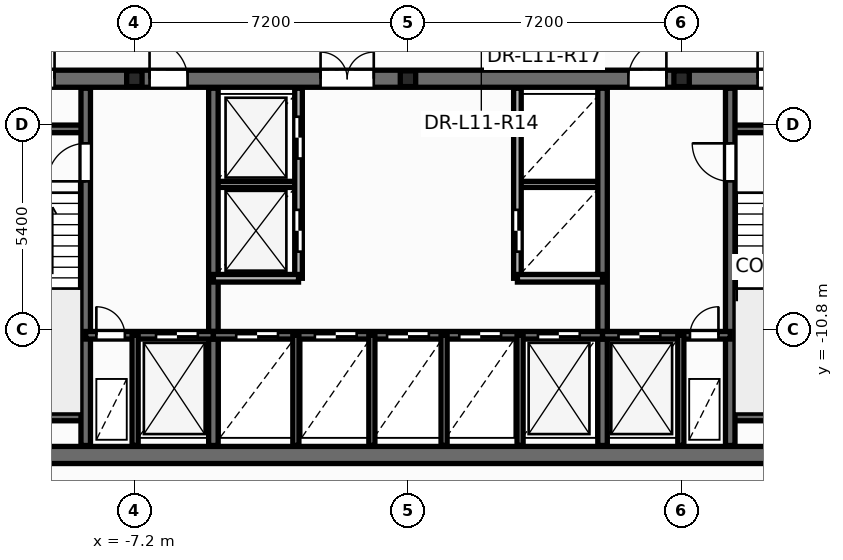
"""IFC4 building model, lengths in metres.
Left out: names, types, materials, properties, quantities, classifications, styles, units other than length and angle.
Written with IfcOpenShell. Run it as: python <this file> out.ifc"""

import sys

from ifc_helpers import new_model, si_unit, direction, frame, frame_2d, origin, origin_2d, place, context, subcontext, project, spatial, rectangle, i_section, extrude, element, fill, save


model = new_model("IFC4")
c1 = context("Model", 3, precision=1e-05, world=origin(), true_north=direction((0.0, 1.0)))
c2 = subcontext(c1, "Body", "Model", "MODEL_VIEW")
j1 = project(units=[si_unit("LENGTHUNIT", "METRE"), si_unit("PLANEANGLEUNIT", "RADIAN")], contexts=[c1])
p1 = place(None, origin())
s1 = spatial("IfcSite", under=j1, at=p1, CompositionType="ELEMENT")
p2 = place(p1, origin())
s2 = spatial("IfcBuilding", under=s1, at=p2, CompositionType="ELEMENT")
p3 = place(p2, frame((0.0, 0.0, 45.9)))
s3 = spatial("IfcBuildingStorey", under=s2, at=p3, CompositionType="ELEMENT", Elevation=45.9)
for number, where, z_axis, x_axis in (
    (1, (-7.2, -4.2, 0.0), (0.0, 0.0, 1.0), (1.0, 0.0, 0.0)),
    (2, (0.0, -4.2, 0.0), (0.0, 0.0, 1.0), (1.0, 0.0, 0.0)),
    (3, (7.2, -4.2, 0.0), (0.0, 0.0, 1.0), (1.0, 0.0, 0.0)),
):
    element("IfcColumn", number, at=place(p3, frame(where, z_axis=z_axis, x_axis=x_axis)), inside=s3, PredefinedType="PILASTER", context=c2, shape_type="SweptSolid", body=[
        extrude(i_section(OverallWidth=0.405, OverallDepth=0.414, WebThickness=0.022, FlangeThickness=0.032, at=origin_2d()), origin(), (0.0, 0.0, 1.0), 3.6),
    ])
for number, where, z_axis, x_axis in (
    (4, (-5.12, -6.98, 0.0), (0.0, 0.0, 1.0), (1.0, 0.0, 0.0)),
    (5, (2.88, -6.98, 0.0), (0.0, 0.0, 1.0), (1.0, 0.0, 0.0)),
):
    element("IfcWall", number, at=place(p3, frame(where, z_axis=z_axis, x_axis=x_axis)), inside=s3, PredefinedType="PARTITIONING", context=c2, shape_type="SweptSolid", body=[
        extrude(rectangle(XDim=2.24, YDim=0.16, at=frame_2d((1.12, 0.0))), origin(), (0.0, 0.0, 1.0), 3.35),
    ])
p4 = place(p3, frame((-12.65, -14.1, 0.0), z_axis=(0.0, 0.0, 1.0), x_axis=(1.0, 0.0, 0.0)))
e6 = element("IfcWall", 6, at=p4, inside=s3, PredefinedType="SHEAR", context=c2, shape_type="SweptSolid", body=[
    extrude(rectangle(XDim=25.3, YDim=0.45, at=frame_2d((12.65, 0.0))), origin(), (0.0, 0.0, 1.0), 3.6),
])
p5 = place(p3, frame((-12.65, -4.2, 0.0), z_axis=(0.0, 0.0, 1.0), x_axis=(1.0, 0.0, 0.0)))
e7 = element("IfcWall", 7, at=p5, inside=s3, PredefinedType="SHEAR", context=c2, shape_type="SweptSolid", body=[
    extrude(rectangle(XDim=25.3, YDim=0.45, at=frame_2d((12.65, 0.0))), origin(), (0.0, 0.0, 1.0), 3.6),
])
p6 = place(p5, frame((0.95, 0.0, 0.0)))
e8 = element("IfcOpeningElement", 8, at=p6, cuts=e7, PredefinedType="OPENING", context=c2, shape_type="SweptSolid", body=[
    extrude(rectangle(XDim=0.756, YDim=2.054, at=frame_2d((0.375, 1.027))), frame((0.0, 0.235, 0.0), z_axis=(0.0, -1.0, 0.0), x_axis=(1.0, 0.0, 0.0)), (0.0, 0.0, 1.0), 0.47),
])
p7 = place(p5, frame((2.6, 0.0, 0.0)))
e9 = element("IfcOpeningElement", 9, at=p7, cuts=e7, PredefinedType="OPENING", context=c2, shape_type="SweptSolid", body=[
    extrude(rectangle(XDim=0.756, YDim=2.054, at=frame_2d((0.375, 1.027))), frame((0.0, 0.235, 0.0), z_axis=(0.0, -1.0, 0.0), x_axis=(1.0, 0.0, 0.0)), (0.0, 0.0, 1.0), 0.47),
])
p8 = place(p5, frame((21.85, 0.0, 0.0)))
e10 = element("IfcOpeningElement", 10, at=p8, cuts=e7, PredefinedType="OPENING", context=c2, shape_type="SweptSolid", body=[
    extrude(rectangle(XDim=0.756, YDim=2.054, at=frame_2d((0.375, 1.027))), frame((0.0, 0.235, 0.0), z_axis=(0.0, -1.0, 0.0), x_axis=(1.0, 0.0, 0.0)), (0.0, 0.0, 1.0), 0.47),
])
p9 = place(p5, frame((23.5, 0.0, 0.0)))
e11 = element("IfcOpeningElement", 11, at=p9, cuts=e7, PredefinedType="OPENING", context=c2, shape_type="SweptSolid", body=[
    extrude(rectangle(XDim=0.756, YDim=2.054, at=frame_2d((0.375, 1.027))), frame((0.0, 0.235, 0.0), z_axis=(0.0, -1.0, 0.0), x_axis=(1.0, 0.0, 0.0)), (0.0, 0.0, 1.0), 0.47),
])
p10 = place(p5, frame((5.85, 0.0, 0.0)))
e12 = element("IfcOpeningElement", 12, at=p10, cuts=e7, PredefinedType="OPENING", context=c2, shape_type="SweptSolid", body=[
    extrude(rectangle(XDim=1.006, YDim=2.104, at=frame_2d((0.5, 1.052))), frame((0.0, 0.235, 0.0), z_axis=(0.0, -1.0, 0.0), x_axis=(1.0, 0.0, 0.0)), (0.0, 0.0, 1.0), 0.47),
])
p11 = place(p5, frame((10.35, 0.0, 0.0)))
e13 = element("IfcOpeningElement", 13, at=p11, cuts=e7, PredefinedType="OPENING", context=c2, shape_type="SweptSolid", body=[
    extrude(rectangle(XDim=1.406, YDim=2.154, at=frame_2d((0.7, 1.077))), frame((0.0, 0.235, 0.0), z_axis=(0.0, -1.0, 0.0), x_axis=(1.0, 0.0, 0.0)), (0.0, 0.0, 1.0), 0.47),
])
p12 = place(p5, frame((18.45, 0.0, 0.0)))
e14 = element("IfcOpeningElement", 14, at=p12, cuts=e7, PredefinedType="OPENING", context=c2, shape_type="SweptSolid", body=[
    extrude(rectangle(XDim=1.006, YDim=2.104, at=frame_2d((0.5, 1.052))), frame((0.0, 0.235, 0.0), z_axis=(0.0, -1.0, 0.0), x_axis=(1.0, 0.0, 0.0)), (0.0, 0.0, 1.0), 0.47),
])
for number, where, z_axis, x_axis in (
    (15, (-12.35, -5.52, 0.0), (0.0, 0.0, 1.0), (1.0, 0.0, 0.0)),
    (16, (-12.35, -13.1, 0.0), (0.0, 0.0, 1.0), (1.0, 0.0, 0.0)),
    (17, (8.48, -5.52, 0.0), (0.0, 0.0, 1.0), (1.0, 0.0, 0.0)),
    (18, (8.48, -13.1, 0.0), (0.0, 0.0, 1.0), (1.0, 0.0, 0.0)),
):
    element("IfcWall", number, at=place(p3, frame(where, z_axis=z_axis, x_axis=x_axis)), inside=s3, PredefinedType="SOLIDWALL", context=c2, shape_type="SweptSolid", body=[
        extrude(rectangle(XDim=3.87, YDim=0.2, at=frame_2d((1.935, 0.0))), origin(), (0.0, 0.0, 1.0), 3.6),
    ])
p13 = place(p3, frame((-8.48, -13.85, 0.0), z_axis=(0.0, 0.0, 1.0), x_axis=(0.0, 1.0, 0.0)))
e19 = element("IfcWall", 19, at=p13, inside=s3, PredefinedType="SHEAR", context=c2, shape_type="SweptSolid", body=[
    extrude(rectangle(XDim=9.4, YDim=0.25, at=frame_2d((4.7, 0.0))), origin(), (0.0, 0.0, 1.0), 3.6),
])
p14 = place(p13, frame((6.95, 0.0, 0.0)))
e20 = element("IfcOpeningElement", 20, at=p14, cuts=e19, PredefinedType="OPENING", context=c2, shape_type="SweptSolid", body=[
    extrude(rectangle(XDim=1.006, YDim=2.104, at=frame_2d((0.5, 1.052))), frame((0.0, 0.135, 0.0), z_axis=(0.0, -1.0, 0.0), x_axis=(1.0, 0.0, 0.0)), (0.0, 0.0, 1.0), 0.27),
])
p15 = place(p3, frame((8.48, -13.85, 0.0), z_axis=(0.0, 0.0, 1.0), x_axis=(0.0, 1.0, 0.0)))
e21 = element("IfcWall", 21, at=p15, inside=s3, PredefinedType="SHEAR", context=c2, shape_type="SweptSolid", body=[
    extrude(rectangle(XDim=9.4, YDim=0.25, at=frame_2d((4.7, 0.0))), origin(), (0.0, 0.0, 1.0), 3.6),
])
p16 = place(p15, frame((6.95, 0.0, 0.0)))
e22 = element("IfcOpeningElement", 22, at=p16, cuts=e21, PredefinedType="OPENING", context=c2, shape_type="SweptSolid", body=[
    extrude(rectangle(XDim=1.006, YDim=2.104, at=frame_2d((0.5, 1.052))), frame((0.0, 0.135, 0.0), z_axis=(0.0, -1.0, 0.0), x_axis=(1.0, 0.0, 0.0)), (0.0, 0.0, 1.0), 0.27),
])
for number, where, z_axis, x_axis in (
    (23, (-5.12, -13.85, 0.0), (0.0, 0.0, 1.0), (0.0, 1.0, 0.0)),
    (24, (5.12, -13.85, 0.0), (0.0, 0.0, 1.0), (0.0, 1.0, 0.0)),
):
    element("IfcWall", number, at=place(p3, frame(where, z_axis=z_axis, x_axis=x_axis)), inside=s3, PredefinedType="SHEAR", context=c2, shape_type="SweptSolid", body=[
        extrude(rectangle(XDim=9.4, YDim=0.25, at=frame_2d((4.7, 0.0))), origin(), (0.0, 0.0, 1.0), 3.6),
    ])
p17 = place(p3, frame((-8.48, -10.95, 0.0), z_axis=(0.0, 0.0, 1.0), x_axis=(1.0, 0.0, 0.0)))
e25 = element("IfcWall", 25, at=p17, inside=s3, PredefinedType="SOLIDWALL", context=c2, shape_type="SweptSolid", body=[
    extrude(rectangle(XDim=3.36, YDim=0.2, at=frame_2d((1.68, 0.0))), origin(), (0.0, 0.0, 1.0), 3.6),
])
p18 = place(p17, frame((0.28, 0.0, 0.0)))
e26 = element("IfcOpeningElement", 26, at=p18, cuts=e25, PredefinedType="OPENING", context=c2, shape_type="SweptSolid", body=[
    extrude(rectangle(XDim=0.756, YDim=2.054, at=frame_2d((0.375, 1.027))), frame((0.0, 0.11, 0.0), z_axis=(0.0, -1.0, 0.0), x_axis=(1.0, 0.0, 0.0)), (0.0, 0.0, 1.0), 0.22),
])
p19 = place(p17, frame((1.85, 0.0, 0.0)))
e27 = element("IfcOpeningElement", 27, at=p19, cuts=e25, PredefinedType="OPENING", context=c2, shape_type="SweptSolid", body=[
    extrude(rectangle(XDim=1.106, YDim=2.104, at=frame_2d((0.55, 1.052))), frame((0.0, 0.11, 0.0), z_axis=(0.0, -1.0, 0.0), x_axis=(1.0, 0.0, 0.0)), (0.0, 0.0, 1.0), 0.22),
])
p20 = place(p3, frame((-5.12, -10.95, 0.0), z_axis=(0.0, 0.0, 1.0), x_axis=(1.0, 0.0, 0.0)))
e28 = element("IfcWall", 28, at=p20, inside=s3, PredefinedType="SOLIDWALL", context=c2, shape_type="SweptSolid", body=[
    extrude(rectangle(XDim=10.24, YDim=0.2, at=frame_2d((5.12, 0.0))), origin(), (0.0, 0.0, 1.0), 3.6),
])
p21 = place(p20, frame((0.6, 0.0, 0.0)))
e29 = element("IfcOpeningElement", 29, at=p21, cuts=e28, PredefinedType="OPENING", context=c2, shape_type="SweptSolid", body=[
    extrude(rectangle(XDim=1.106, YDim=2.104, at=frame_2d((0.55, 1.052))), frame((0.0, 0.11, 0.0), z_axis=(0.0, -1.0, 0.0), x_axis=(1.0, 0.0, 0.0)), (0.0, 0.0, 1.0), 0.22),
])
p22 = place(p20, frame((2.67, 0.0, 0.0)))
e30 = element("IfcOpeningElement", 30, at=p22, cuts=e28, PredefinedType="OPENING", context=c2, shape_type="SweptSolid", body=[
    extrude(rectangle(XDim=1.106, YDim=2.104, at=frame_2d((0.55, 1.052))), frame((0.0, 0.11, 0.0), z_axis=(0.0, -1.0, 0.0), x_axis=(1.0, 0.0, 0.0)), (0.0, 0.0, 1.0), 0.22),
])
p23 = place(p20, frame((4.57, 0.0, 0.0)))
e31 = element("IfcOpeningElement", 31, at=p23, cuts=e28, PredefinedType="OPENING", context=c2, shape_type="SweptSolid", body=[
    extrude(rectangle(XDim=1.106, YDim=2.104, at=frame_2d((0.55, 1.052))), frame((0.0, 0.11, 0.0), z_axis=(0.0, -1.0, 0.0), x_axis=(1.0, 0.0, 0.0)), (0.0, 0.0, 1.0), 0.22),
])
p24 = place(p20, frame((6.47, 0.0, 0.0)))
e32 = element("IfcOpeningElement", 32, at=p24, cuts=e28, PredefinedType="OPENING", context=c2, shape_type="SweptSolid", body=[
    extrude(rectangle(XDim=1.106, YDim=2.104, at=frame_2d((0.55, 1.052))), frame((0.0, 0.11, 0.0), z_axis=(0.0, -1.0, 0.0), x_axis=(1.0, 0.0, 0.0)), (0.0, 0.0, 1.0), 0.22),
])
p25 = place(p20, frame((8.54, 0.0, 0.0)))
e33 = element("IfcOpeningElement", 33, at=p25, cuts=e28, PredefinedType="OPENING", context=c2, shape_type="SweptSolid", body=[
    extrude(rectangle(XDim=1.106, YDim=2.104, at=frame_2d((0.55, 1.052))), frame((0.0, 0.11, 0.0), z_axis=(0.0, -1.0, 0.0), x_axis=(1.0, 0.0, 0.0)), (0.0, 0.0, 1.0), 0.22),
])
p26 = place(p3, frame((5.12, -10.95, 0.0), z_axis=(0.0, 0.0, 1.0), x_axis=(1.0, 0.0, 0.0)))
e34 = element("IfcWall", 34, at=p26, inside=s3, PredefinedType="SOLIDWALL", context=c2, shape_type="SweptSolid", body=[
    extrude(rectangle(XDim=3.36, YDim=0.2, at=frame_2d((1.68, 0.0))), origin(), (0.0, 0.0, 1.0), 3.6),
])
p27 = place(p26, frame((0.42, 0.0, 0.0)))
e35 = element("IfcOpeningElement", 35, at=p27, cuts=e34, PredefinedType="OPENING", context=c2, shape_type="SweptSolid", body=[
    extrude(rectangle(XDim=1.106, YDim=2.104, at=frame_2d((0.55, 1.052))), frame((0.0, 0.11, 0.0), z_axis=(0.0, -1.0, 0.0), x_axis=(1.0, 0.0, 0.0)), (0.0, 0.0, 1.0), 0.22),
])
p28 = place(p26, frame((2.3, 0.0, 0.0)))
e36 = element("IfcOpeningElement", 36, at=p28, cuts=e34, PredefinedType="OPENING", context=c2, shape_type="SweptSolid", body=[
    extrude(rectangle(XDim=0.756, YDim=2.054, at=frame_2d((0.375, 1.027))), frame((0.0, 0.11, 0.0), z_axis=(0.0, -1.0, 0.0), x_axis=(1.0, 0.0, 0.0)), (0.0, 0.0, 1.0), 0.22),
])
for number, where, z_axis, x_axis in (
    (37, (-7.18, -13.85, 0.0), (0.0, 0.0, 1.0), (0.0, 1.0, 0.0)),
    (38, (7.18, -13.85, 0.0), (0.0, 0.0, 1.0), (0.0, 1.0, 0.0)),
    (39, (-2.95, -13.85, 0.0), (0.0, 0.0, 1.0), (0.0, 1.0, 0.0)),
    (40, (2.95, -13.85, 0.0), (0.0, 0.0, 1.0), (0.0, 1.0, 0.0)),
):
    element("IfcWall", number, at=place(p3, frame(where, z_axis=z_axis, x_axis=x_axis)), inside=s3, PredefinedType="PARTITIONING", context=c2, shape_type="SweptSolid", body=[
        extrude(rectangle(XDim=2.9, YDim=0.16, at=frame_2d((1.45, 0.0))), origin(), (0.0, 0.0, 1.0), 2.375),
    ])
p29 = place(p3, frame((-2.88, -9.45, 0.0), z_axis=(0.0, 0.0, 1.0), x_axis=(0.0, 1.0, 0.0)))
e41 = element("IfcWall", 41, at=p29, inside=s3, PredefinedType="SOLIDWALL", context=c2, shape_type="SweptSolid", body=[
    extrude(rectangle(XDim=5.0, YDim=0.2, at=frame_2d((2.5, 0.0))), origin(), (0.0, 0.0, 1.0), 3.35),
])
p30 = place(p29, frame((0.7, 0.0, 0.0)))
e42 = element("IfcOpeningElement", 42, at=p30, cuts=e41, PredefinedType="OPENING", context=c2, shape_type="SweptSolid", body=[
    extrude(rectangle(XDim=1.106, YDim=2.104, at=frame_2d((0.55, 1.052))), frame((0.0, 0.11, 0.0), z_axis=(0.0, -1.0, 0.0), x_axis=(1.0, 0.0, 0.0)), (0.0, 0.0, 1.0), 0.22),
])
p31 = place(p29, frame((3.15, 0.0, 0.0)))
e43 = element("IfcOpeningElement", 43, at=p31, cuts=e41, PredefinedType="OPENING", context=c2, shape_type="SweptSolid", body=[
    extrude(rectangle(XDim=1.106, YDim=2.104, at=frame_2d((0.55, 1.052))), frame((0.0, 0.11, 0.0), z_axis=(0.0, -1.0, 0.0), x_axis=(1.0, 0.0, 0.0)), (0.0, 0.0, 1.0), 0.22),
])
p32 = place(p3, frame((-5.12, -9.45, 0.0), z_axis=(0.0, 0.0, 1.0), x_axis=(1.0, 0.0, 0.0)))
e44 = element("IfcWall", 44, at=p32, inside=s3, PredefinedType="SOLIDWALL", context=c2, shape_type="SweptSolid", body=[
    extrude(rectangle(XDim=2.24, YDim=0.2, at=frame_2d((1.12, 0.0))), origin(), (0.0, 0.0, 1.0), 3.35),
])
p33 = place(p3, frame((2.88, -9.45, 0.0), z_axis=(0.0, 0.0, 1.0), x_axis=(0.0, 1.0, 0.0)))
e45 = element("IfcWall", 45, at=p33, inside=s3, PredefinedType="SOLIDWALL", context=c2, shape_type="SweptSolid", body=[
    extrude(rectangle(XDim=5.0, YDim=0.2, at=frame_2d((2.5, 0.0))), origin(), (0.0, 0.0, 1.0), 3.35),
])
p34 = place(p33, frame((0.7, 0.0, 0.0)))
e46 = element("IfcOpeningElement", 46, at=p34, cuts=e45, PredefinedType="OPENING", context=c2, shape_type="SweptSolid", body=[
    extrude(rectangle(XDim=1.106, YDim=2.104, at=frame_2d((0.55, 1.052))), frame((0.0, 0.11, 0.0), z_axis=(0.0, -1.0, 0.0), x_axis=(1.0, 0.0, 0.0)), (0.0, 0.0, 1.0), 0.22),
])
p35 = place(p3, frame((2.88, -9.45, 0.0), z_axis=(0.0, 0.0, 1.0), x_axis=(1.0, 0.0, 0.0)))
e47 = element("IfcWall", 47, at=p35, inside=s3, PredefinedType="SOLIDWALL", context=c2, shape_type="SweptSolid", body=[
    extrude(rectangle(XDim=2.24, YDim=0.2, at=frame_2d((1.12, 0.0))), origin(), (0.0, 0.0, 1.0), 3.35),
])
for number, where, z_axis, x_axis in (
    (48, (-0.95, -13.85, 0.0), (0.0, 0.0, 1.0), (0.0, 1.0, 0.0)),
    (49, (0.95, -13.85, 0.0), (0.0, 0.0, 1.0), (0.0, 1.0, 0.0)),
):
    element("IfcWall", number, at=place(p3, frame(where, z_axis=z_axis, x_axis=x_axis)), inside=s3, PredefinedType="PARTITIONING", context=c2, shape_type="SweptSolid", body=[
        extrude(rectangle(XDim=2.9, YDim=0.16, at=frame_2d((1.45, 0.0))), origin(), (0.0, 0.0, 1.0), 2.375),
    ])
p36 = place(p30, origin())
e50 = element("IfcDoor", 50, at=p36, inside=s3, OperationType="DOUBLE_DOOR_SLIDING", PredefinedType="DOOR", context=c2, shape_type="SweptSolid", body=[
    extrude(rectangle(XDim=1.1, YDim=2.1, at=frame_2d((0.55, 1.05))), frame((0.0, 0.025, 0.0), z_axis=(0.0, -1.0, 0.0), x_axis=(1.0, 0.0, 0.0)), (0.0, 0.0, 1.0), 0.05),
])
fill(e42, e50)
p37 = place(p31, origin())
e51 = element("IfcDoor", 51, at=p37, inside=s3, OperationType="DOUBLE_DOOR_SLIDING", PredefinedType="DOOR", context=c2, shape_type="SweptSolid", body=[
    extrude(rectangle(XDim=1.1, YDim=2.1, at=frame_2d((0.55, 1.05))), frame((0.0, 0.025, 0.0), z_axis=(0.0, -1.0, 0.0), x_axis=(1.0, 0.0, 0.0)), (0.0, 0.0, 1.0), 0.05),
])
fill(e43, e51)
p38 = place(p34, origin())
e52 = element("IfcDoor", 52, at=p38, inside=s3, OperationType="DOUBLE_DOOR_SLIDING", PredefinedType="DOOR", context=c2, shape_type="SweptSolid", body=[
    extrude(rectangle(XDim=1.1, YDim=2.1, at=frame_2d((0.55, 1.05))), frame((0.0, 0.025, 0.0), z_axis=(0.0, -1.0, 0.0), x_axis=(1.0, 0.0, 0.0)), (0.0, 0.0, 1.0), 0.05),
])
fill(e46, e52)
p39 = place(p14, origin())
e53 = element("IfcDoor", 53, at=p39, inside=s3, OperationType="SINGLE_SWING_LEFT", PredefinedType="DOOR", context=c2, shape_type="SweptSolid", body=[
    extrude(rectangle(XDim=1.0, YDim=2.1, at=frame_2d((0.5, 1.05))), frame((0.0, 0.025, 0.0), z_axis=(0.0, -1.0, 0.0), x_axis=(1.0, 0.0, 0.0)), (0.0, 0.0, 1.0), 0.05),
])
fill(e20, e53)
p40 = place(p16, origin())
e54 = element("IfcDoor", 54, at=p40, inside=s3, OperationType="SINGLE_SWING_RIGHT", PredefinedType="DOOR", context=c2, shape_type="SweptSolid", body=[
    extrude(rectangle(XDim=1.0, YDim=2.1, at=frame_2d((0.5, 1.05))), frame((0.0, 0.025, 0.0), z_axis=(0.0, -1.0, 0.0), x_axis=(1.0, 0.0, 0.0)), (0.0, 0.0, 1.0), 0.05),
])
fill(e22, e54)
p41 = place(p18, origin())
e55 = element("IfcDoor", 55, at=p41, inside=s3, OperationType="SINGLE_SWING_LEFT", PredefinedType="DOOR", context=c2, shape_type="SweptSolid", body=[
    extrude(rectangle(XDim=0.75, YDim=2.05, at=frame_2d((0.375, 1.025))), frame((0.0, 0.025, 0.0), z_axis=(0.0, -1.0, 0.0), x_axis=(1.0, 0.0, 0.0)), (0.0, 0.0, 1.0), 0.05),
])
fill(e26, e55)
p42 = place(p19, origin())
e56 = element("IfcDoor", 56, at=p42, inside=s3, OperationType="DOUBLE_DOOR_SLIDING", PredefinedType="DOOR", context=c2, shape_type="SweptSolid", body=[
    extrude(rectangle(XDim=1.1, YDim=2.1, at=frame_2d((0.55, 1.05))), frame((0.0, 0.025, 0.0), z_axis=(0.0, -1.0, 0.0), x_axis=(1.0, 0.0, 0.0)), (0.0, 0.0, 1.0), 0.05),
])
fill(e27, e56)
p43 = place(p27, origin())
e57 = element("IfcDoor", 57, at=p43, inside=s3, OperationType="DOUBLE_DOOR_SLIDING", PredefinedType="DOOR", context=c2, shape_type="SweptSolid", body=[
    extrude(rectangle(XDim=1.1, YDim=2.1, at=frame_2d((0.55, 1.05))), frame((0.0, 0.025, 0.0), z_axis=(0.0, -1.0, 0.0), x_axis=(1.0, 0.0, 0.0)), (0.0, 0.0, 1.0), 0.05),
])
fill(e35, e57)
p44 = place(p28, origin())
e58 = element("IfcDoor", 58, at=p44, inside=s3, OperationType="SINGLE_SWING_RIGHT", PredefinedType="DOOR", context=c2, shape_type="SweptSolid", body=[
    extrude(rectangle(XDim=0.75, YDim=2.05, at=frame_2d((0.375, 1.025))), frame((0.0, 0.025, 0.0), z_axis=(0.0, -1.0, 0.0), x_axis=(1.0, 0.0, 0.0)), (0.0, 0.0, 1.0), 0.05),
])
fill(e36, e58)
p45 = place(p21, origin())
e59 = element("IfcDoor", 59, at=p45, inside=s3, OperationType="DOUBLE_DOOR_SLIDING", PredefinedType="DOOR", context=c2, shape_type="SweptSolid", body=[
    extrude(rectangle(XDim=1.1, YDim=2.1, at=frame_2d((0.55, 1.05))), frame((0.0, 0.025, 0.0), z_axis=(0.0, -1.0, 0.0), x_axis=(1.0, 0.0, 0.0)), (0.0, 0.0, 1.0), 0.05),
])
fill(e29, e59)
p46 = place(p22, origin())
e60 = element("IfcDoor", 60, at=p46, inside=s3, OperationType="DOUBLE_DOOR_SLIDING", PredefinedType="DOOR", context=c2, shape_type="SweptSolid", body=[
    extrude(rectangle(XDim=1.1, YDim=2.1, at=frame_2d((0.55, 1.05))), frame((0.0, 0.025, 0.0), z_axis=(0.0, -1.0, 0.0), x_axis=(1.0, 0.0, 0.0)), (0.0, 0.0, 1.0), 0.05),
])
fill(e30, e60)
p47 = place(p23, origin())
e61 = element("IfcDoor", 61, at=p47, inside=s3, OperationType="DOUBLE_DOOR_SLIDING", PredefinedType="DOOR", context=c2, shape_type="SweptSolid", body=[
    extrude(rectangle(XDim=1.1, YDim=2.1, at=frame_2d((0.55, 1.05))), frame((0.0, 0.025, 0.0), z_axis=(0.0, -1.0, 0.0), x_axis=(1.0, 0.0, 0.0)), (0.0, 0.0, 1.0), 0.05),
])
fill(e31, e61)
p48 = place(p24, origin())
e62 = element("IfcDoor", 62, at=p48, inside=s3, OperationType="DOUBLE_DOOR_SLIDING", PredefinedType="DOOR", context=c2, shape_type="SweptSolid", body=[
    extrude(rectangle(XDim=1.1, YDim=2.1, at=frame_2d((0.55, 1.05))), frame((0.0, 0.025, 0.0), z_axis=(0.0, -1.0, 0.0), x_axis=(1.0, 0.0, 0.0)), (0.0, 0.0, 1.0), 0.05),
])
fill(e32, e62)
p49 = place(p25, origin())
e63 = element("IfcDoor", 63, at=p49, inside=s3, OperationType="DOUBLE_DOOR_SLIDING", PredefinedType="DOOR", context=c2, shape_type="SweptSolid", body=[
    extrude(rectangle(XDim=1.1, YDim=2.1, at=frame_2d((0.55, 1.05))), frame((0.0, 0.025, 0.0), z_axis=(0.0, -1.0, 0.0), x_axis=(1.0, 0.0, 0.0)), (0.0, 0.0, 1.0), 0.05),
])
fill(e33, e63)
p50 = place(p7, origin())
e64 = element("IfcDoor", 64, at=p50, inside=s3, OperationType="SINGLE_SWING_RIGHT", PredefinedType="DOOR", context=c2, shape_type="SweptSolid", body=[
    extrude(rectangle(XDim=0.75, YDim=2.05, at=frame_2d((0.375, 1.025))), frame((0.0, 0.025, 0.0), z_axis=(0.0, -1.0, 0.0), x_axis=(1.0, 0.0, 0.0)), (0.0, 0.0, 1.0), 0.05),
])
fill(e9, e64)
p51 = place(p8, origin())
e65 = element("IfcDoor", 65, at=p51, inside=s3, OperationType="SINGLE_SWING_LEFT", PredefinedType="DOOR", context=c2, shape_type="SweptSolid", body=[
    extrude(rectangle(XDim=0.75, YDim=2.05, at=frame_2d((0.375, 1.025))), frame((0.0, 0.025, 0.0), z_axis=(0.0, -1.0, 0.0), x_axis=(1.0, 0.0, 0.0)), (0.0, 0.0, 1.0), 0.05),
])
fill(e10, e65)
p52 = place(p10, origin())
e66 = element("IfcDoor", 66, at=p52, inside=s3, OperationType="SINGLE_SWING_LEFT", PredefinedType="DOOR", context=c2, shape_type="SweptSolid", body=[
    extrude(rectangle(XDim=1.0, YDim=2.1, at=frame_2d((0.5, 1.05))), frame((0.0, 0.025, 0.0), z_axis=(0.0, -1.0, 0.0), x_axis=(1.0, 0.0, 0.0)), (0.0, 0.0, 1.0), 0.05),
])
fill(e12, e66)
p53 = place(p11, origin())
e67 = element("IfcDoor", 67, at=p53, inside=s3, OperationType="DOUBLE_DOOR_SINGLE_SWING", PredefinedType="DOOR", context=c2, shape_type="SweptSolid", body=[
    extrude(rectangle(XDim=1.4, YDim=2.15, at=frame_2d((0.7, 1.075))), frame((0.0, 0.025, 0.0), z_axis=(0.0, -1.0, 0.0), x_axis=(1.0, 0.0, 0.0)), (0.0, 0.0, 1.0), 0.05),
])
fill(e13, e67)
p54 = place(p12, origin())
e68 = element("IfcDoor", 68, at=p54, inside=s3, OperationType="SINGLE_SWING_RIGHT", PredefinedType="DOOR", context=c2, shape_type="SweptSolid", body=[
    extrude(rectangle(XDim=1.0, YDim=2.1, at=frame_2d((0.5, 1.05))), frame((0.0, 0.025, 0.0), z_axis=(0.0, -1.0, 0.0), x_axis=(1.0, 0.0, 0.0)), (0.0, 0.0, 1.0), 0.05),
])
fill(e14, e68)
save(model, sys.argv[1])
